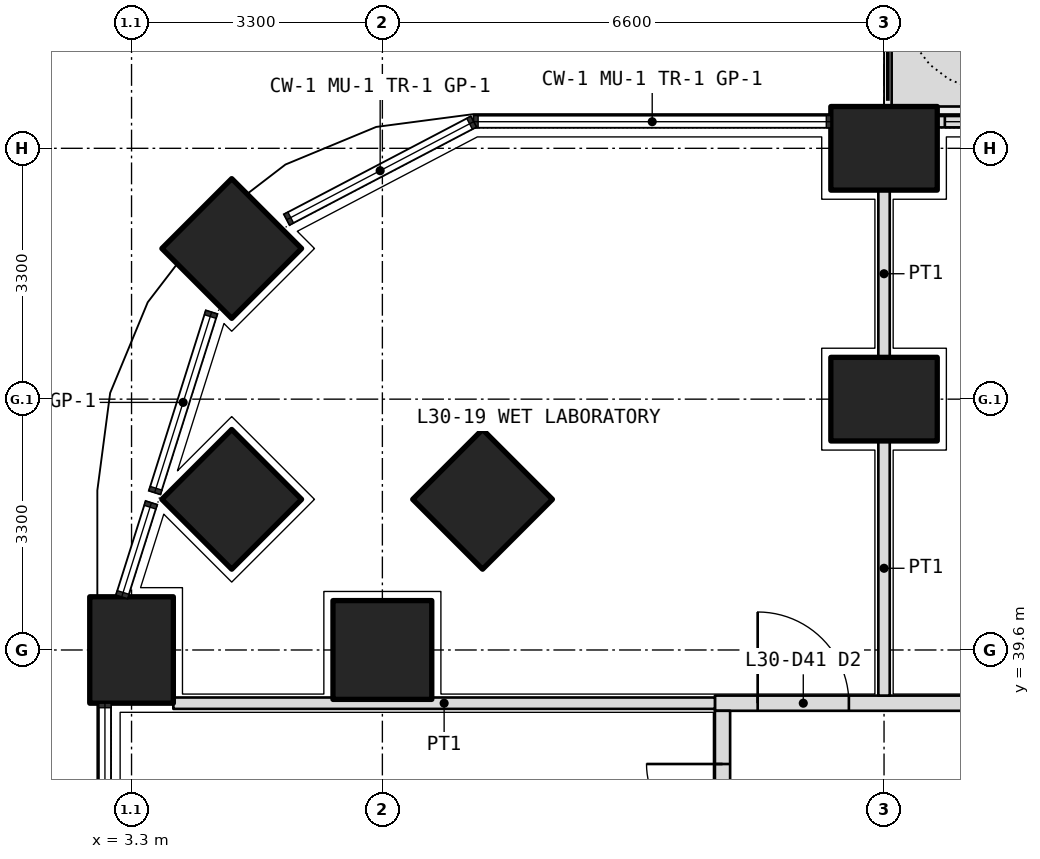
"""IFC4 building model, lengths in metres.
Left out: names, types, materials, properties, quantities, classifications, styles, units other than length and angle.
Written with IfcOpenShell. Run it as: python <this file> out.ifc"""

import sys

from ifc_helpers import new_model, si_unit, direction, frame, frame_2d, origin, origin_2d, place, context, subcontext, project, spatial, polyline, rectangle, outline, extrude, element, fill, save


model = new_model("IFC4")
c1 = context("Model", 3, precision=1e-05, world=origin(), true_north=direction((0.0, 1.0)))
c2 = subcontext(c1, "Body", "Model", "MODEL_VIEW")
j1 = project(units=[si_unit("LENGTHUNIT", "METRE"), si_unit("PLANEANGLEUNIT", "RADIAN")], contexts=[c1])
p1 = place(None, origin())
s1 = spatial("IfcSite", under=j1, at=p1, CompositionType="ELEMENT")
p2 = place(p1, origin())
s2 = spatial("IfcBuilding", under=s1, at=p2, CompositionType="ELEMENT")
p3 = place(p2, frame((0.0, 0.0, 132.6)))
s3 = spatial("IfcBuildingStorey", under=s2, at=p3, CompositionType="ELEMENT", Elevation=132.6)
p4 = place(p3, frame((4.618, 44.882, 0.0), z_axis=(0.0, 0.0, 1.0), x_axis=(0.707106781187, 0.707106781187, 0.0)))
e1 = element("IfcColumn", 1, at=p4, inside=s3, PredefinedType="COLUMN", context=c2, shape_type="SweptSolid", body=[
    extrude(rectangle(XDim=1.3, YDim=1.3, at=origin_2d()), origin(), (0.0, 0.0, 1.0), 4.2),
])
for number, where, z_axis, x_axis in (
    (2, (3.3, 39.6, 0.0), (0.0, 0.0, 1.0), (0.0, 1.0, 0.0)),
    (3, (13.2, 46.2, 0.0), (0.0, 0.0, 1.0), (1.0, 0.0, 0.0)),
):
    element("IfcColumn", number, at=place(p3, frame(where, z_axis=z_axis, x_axis=x_axis)), inside=s3, PredefinedType="COLUMN", context=c2, shape_type="SweptSolid", body=[
        extrude(rectangle(XDim=1.4, YDim=1.1, at=origin_2d()), origin(), (0.0, 0.0, 1.0), 4.2),
    ])
for number, where, z_axis, x_axis in (
    (4, (6.6, 39.6, 0.0), (0.0, 0.0, 1.0), (1.0, 0.0, 0.0)),
    (5, (4.618, 41.582, 0.0), (0.0, 0.0, 1.0), (0.707, 0.707, 0.0)),
):
    element("IfcColumn", number, at=place(p3, frame(where, z_axis=z_axis, x_axis=x_axis)), inside=s3, PredefinedType="COLUMN", context=c2, shape_type="SweptSolid", body=[
        extrude(rectangle(XDim=1.3, YDim=1.3, at=origin_2d()), origin(), (0.0, 0.0, 1.0), 4.2),
    ])
p5 = place(p3, frame((13.2, 42.9, 0.0), z_axis=(0.0, 0.0, 1.0), x_axis=(1.0, 0.0, 0.0)))
e6 = element("IfcColumn", 6, at=p5, inside=s3, PredefinedType="COLUMN", context=c2, shape_type="SweptSolid", body=[
    extrude(rectangle(XDim=1.4, YDim=1.1, at=origin_2d()), origin(), (0.0, 0.0, 1.0), 4.2),
])
p6 = place(p3, frame((7.918, 41.582, 0.0), z_axis=(0.0, 0.0, 1.0), x_axis=(0.707106781187, 0.707106781187, 0.0)))
e7 = element("IfcColumn", 7, at=p6, inside=s3, PredefinedType="COLUMN", context=c2, shape_type="SweptSolid", body=[
    extrude(rectangle(XDim=1.3, YDim=1.3, at=origin_2d()), origin(), (0.0, 0.0, 1.0), 4.2),
])
p7 = place(p3, origin())
e8 = element("IfcWall", 8, at=p7, inside=s3, PredefinedType="USERDEFINED", context=c2, shape_type="SweptSolid", body=[
    extrude(outline(polyline([(13.3, 46.75), (15.75, 46.75), (15.75, 47.75), (13.3, 47.75), (13.3, 46.75)]), holes=[polyline([(13.45, 46.9), (15.6, 46.9), (15.6, 47.6), (13.45, 47.6), (13.45, 46.9)])]), origin(), (0.0, 0.0, 1.0), 1.05),
])
p8 = place(p3, frame((19.1, 46.55, 0.0), z_axis=(0.0, 0.0, 1.0), x_axis=(-1.0, 0.0, 0.0)))
e9 = element("IfcWall", 9, at=p8, inside=s3, PredefinedType="SOLIDWALL", context=c2, shape_type="SweptSolid", body=[
    extrude(rectangle(XDim=5.2, YDim=0.15, at=frame_2d((2.6, 0.0))), origin(), (0.0, 0.0, 1.0), 2.7),
])
p9 = place(p8, frame((1.35, 0.0, 0.0)))
e10 = element("IfcOpeningElement", 10, at=p9, cuts=e9, PredefinedType="OPENING", context=c2, shape_type="SweptSolid", body=[
    extrude(rectangle(XDim=1.0, YDim=2.4, at=frame_2d((0.5, 1.2))), frame((0.0, 0.085, 0.0), z_axis=(0.0, -1.0, 0.0), x_axis=(1.0, 0.0, 0.0)), (0.0, 0.0, 1.0), 0.17),
])
p10 = place(p8, frame((0.1, 0.0, 0.1)))
e11 = element("IfcOpeningElement", 11, at=p10, cuts=e9, PredefinedType="OPENING", context=c2, shape_type="SweptSolid", body=[
    extrude(rectangle(XDim=1.15, YDim=2.3, at=frame_2d((0.575, 1.15))), frame((0.0, 0.085, 0.0), z_axis=(0.0, -1.0, 0.0), x_axis=(1.0, 0.0, 0.0)), (0.0, 0.0, 1.0), 0.17),
])
p11 = place(p8, frame((2.85, 0.0, 0.1)))
e12 = element("IfcOpeningElement", 12, at=p11, cuts=e9, PredefinedType="OPENING", context=c2, shape_type="SweptSolid", body=[
    extrude(rectangle(XDim=2.25, YDim=2.3, at=frame_2d((1.125, 1.15))), frame((0.0, 0.085, 0.0), z_axis=(0.0, -1.0, 0.0), x_axis=(1.0, 0.0, 0.0)), (0.0, 0.0, 1.0), 0.17),
])
p12 = place(p3, frame((10.975, 38.9, 0.0), z_axis=(0.0, 0.0, 1.0), x_axis=(1.0, 0.0, 0.0)))
e13 = element("IfcWall", 13, at=p12, inside=s3, PredefinedType="PARTITIONING", context=c2, shape_type="SweptSolid", body=[
    extrude(rectangle(XDim=30.85, YDim=0.2, at=frame_2d((15.425, 0.0))), origin(), (0.0, 0.0, 1.0), 2.85),
])
p13 = place(p12, frame((0.562, 0.0, 0.0)))
e14 = element("IfcOpeningElement", 14, at=p13, cuts=e13, PredefinedType="OPENING", context=c2, shape_type="SweptSolid", body=[
    extrude(rectangle(XDim=1.2, YDim=2.1, at=frame_2d((0.6, 1.05))), frame((0.0, 0.11, 0.0), z_axis=(0.0, -1.0, 0.0), x_axis=(1.0, 0.0, 0.0)), (0.0, 0.0, 1.0), 0.22),
])
p14 = place(p12, frame((6.675, 0.0, 0.0)))
e15 = element("IfcOpeningElement", 15, at=p14, cuts=e13, PredefinedType="OPENING", context=c2, shape_type="SweptSolid", body=[
    extrude(rectangle(XDim=1.0, YDim=2.1, at=frame_2d((0.5, 1.05))), frame((0.0, 0.11, 0.0), z_axis=(0.0, -1.0, 0.0), x_axis=(1.0, 0.0, 0.0)), (0.0, 0.0, 1.0), 0.22),
])
p15 = place(p12, frame((16.575, 0.0, 0.0)))
e16 = element("IfcOpeningElement", 16, at=p15, cuts=e13, PredefinedType="OPENING", context=c2, shape_type="SweptSolid", body=[
    extrude(rectangle(XDim=1.0, YDim=2.1, at=frame_2d((0.5, 1.05))), frame((0.0, 0.11, 0.0), z_axis=(0.0, -1.0, 0.0), x_axis=(1.0, 0.0, 0.0)), (0.0, 0.0, 1.0), 0.22),
])
p16 = place(p12, frame((25.887, 0.0, 0.0)))
e17 = element("IfcOpeningElement", 17, at=p16, cuts=e13, PredefinedType="OPENING", context=c2, shape_type="SweptSolid", body=[
    extrude(rectangle(XDim=1.0, YDim=2.1, at=frame_2d((0.5, 1.05))), frame((0.0, 0.11, 0.0), z_axis=(0.0, -1.0, 0.0), x_axis=(1.0, 0.0, 0.0)), (0.0, 0.0, 1.0), 0.22),
])
p17 = place(p3, frame((11.075, 11.175, 0.0), z_axis=(0.0, 0.0, 1.0), x_axis=(0.0, 1.0, 0.0)))
e18 = element("IfcWall", 18, at=p17, inside=s3, PredefinedType="PARTITIONING", context=c2, shape_type="SweptSolid", body=[
    extrude(rectangle(XDim=27.625, YDim=0.2, at=frame_2d((13.812, 0.0))), origin(), (0.0, 0.0, 1.0), 2.85),
])
p18 = place(p17, frame((0.462, 0.0, 0.0)))
e19 = element("IfcOpeningElement", 19, at=p18, cuts=e18, PredefinedType="OPENING", context=c2, shape_type="SweptSolid", body=[
    extrude(rectangle(XDim=1.0, YDim=2.1, at=frame_2d((0.5, 1.05))), frame((0.0, 0.11, 0.0), z_axis=(0.0, -1.0, 0.0), x_axis=(1.0, 0.0, 0.0)), (0.0, 0.0, 1.0), 0.22),
])
p19 = place(p17, frame((2.575, 0.0, 0.0)))
e20 = element("IfcOpeningElement", 20, at=p19, cuts=e18, PredefinedType="OPENING", context=c2, shape_type="SweptSolid", body=[
    extrude(rectangle(XDim=1.0, YDim=2.1, at=frame_2d((0.5, 1.05))), frame((0.0, 0.11, 0.0), z_axis=(0.0, -1.0, 0.0), x_axis=(1.0, 0.0, 0.0)), (0.0, 0.0, 1.0), 0.22),
])
p20 = place(p17, frame((5.625, 0.0, 0.0)))
e21 = element("IfcOpeningElement", 21, at=p20, cuts=e18, PredefinedType="OPENING", context=c2, shape_type="SweptSolid", body=[
    extrude(rectangle(XDim=0.9, YDim=2.1, at=frame_2d((0.45, 1.05))), frame((0.0, 0.11, 0.0), z_axis=(0.0, -1.0, 0.0), x_axis=(1.0, 0.0, 0.0)), (0.0, 0.0, 1.0), 0.22),
])
p21 = place(p17, frame((9.425, 0.0, 0.0)))
e22 = element("IfcOpeningElement", 22, at=p21, cuts=e18, PredefinedType="OPENING", context=c2, shape_type="SweptSolid", body=[
    extrude(rectangle(XDim=0.9, YDim=2.1, at=frame_2d((0.45, 1.05))), frame((0.0, 0.11, 0.0), z_axis=(0.0, -1.0, 0.0), x_axis=(1.0, 0.0, 0.0)), (0.0, 0.0, 1.0), 0.22),
])
p22 = place(p17, frame((12.975, 0.0, 0.0)))
e23 = element("IfcOpeningElement", 23, at=p22, cuts=e18, PredefinedType="OPENING", context=c2, shape_type="SweptSolid", body=[
    extrude(rectangle(XDim=1.0, YDim=2.1, at=frame_2d((0.5, 1.05))), frame((0.0, 0.11, 0.0), z_axis=(0.0, -1.0, 0.0), x_axis=(1.0, 0.0, 0.0)), (0.0, 0.0, 1.0), 0.22),
])
p23 = place(p17, frame((19.675, 0.0, 0.0)))
e24 = element("IfcOpeningElement", 24, at=p23, cuts=e18, PredefinedType="OPENING", context=c2, shape_type="SweptSolid", body=[
    extrude(rectangle(XDim=1.0, YDim=2.1, at=frame_2d((0.5, 1.05))), frame((0.0, 0.11, 0.0), z_axis=(0.0, -1.0, 0.0), x_axis=(1.0, 0.0, 0.0)), (0.0, 0.0, 1.0), 0.22),
])
p24 = place(p17, frame((25.925, 0.0, 0.0)))
e25 = element("IfcOpeningElement", 25, at=p24, cuts=e18, PredefinedType="OPENING", context=c2, shape_type="SweptSolid", body=[
    extrude(rectangle(XDim=1.0, YDim=2.1, at=frame_2d((0.5, 1.05))), frame((0.0, 0.11, 0.0), z_axis=(0.0, -1.0, 0.0), x_axis=(1.0, 0.0, 0.0)), (0.0, 0.0, 1.0), 0.22),
])
p25 = place(p3, frame((3.85, 38.9, 0.0), z_axis=(0.0, 0.0, 1.0), x_axis=(1.0, 0.0, 0.0)))
e26 = element("IfcWall", 26, at=p25, inside=s3, PredefinedType="PARTITIONING", context=c2, shape_type="SweptSolid", body=[
    extrude(rectangle(XDim=7.125, YDim=0.15, at=frame_2d((3.562, 0.0))), origin(), (0.0, 0.0, 1.0), 2.85),
])
p26 = place(p3, frame((13.2, 45.65, 0.0), z_axis=(0.0, 0.0, 1.0), x_axis=(0.0, -1.0, 0.0)))
e27 = element("IfcWall", 27, at=p26, inside=s3, PredefinedType="PARTITIONING", context=c2, shape_type="SweptSolid", body=[
    extrude(rectangle(XDim=2.2, YDim=0.15, at=frame_2d((1.1, 0.0))), origin(), (0.0, 0.0, 1.0), 2.85),
])
p27 = place(p3, frame((13.2, 42.35, 0.0), z_axis=(0.0, 0.0, 1.0), x_axis=(0.0, -1.0, 0.0)))
e28 = element("IfcWall", 28, at=p27, inside=s3, PredefinedType="PARTITIONING", context=c2, shape_type="SweptSolid", body=[
    extrude(rectangle(XDim=3.35, YDim=0.15, at=frame_2d((1.675, 0.0))), origin(), (0.0, 0.0, 1.0), 2.85),
])
p28 = place(p11, origin())
e29 = element("IfcWindow", 29, at=p28, inside=s3, PartitioningType="SINGLE_PANEL", PredefinedType="WINDOW", context=c2, shape_type="SweptSolid", body=[
    extrude(rectangle(XDim=2.25, YDim=2.3, at=frame_2d((1.125, 1.15))), frame((0.0, 0.03, 0.0), z_axis=(0.0, -1.0, 0.0), x_axis=(1.0, 0.0, 0.0)), (0.0, 0.0, 1.0), 0.06),
])
fill(e12, e29)
p29 = place(p13, origin())
e30 = element("IfcDoor", 30, at=p29, inside=s3, OperationType="DOUBLE_DOOR_SINGLE_SWING", PredefinedType="DOOR", context=c2, shape_type="SweptSolid", body=[
    extrude(rectangle(XDim=1.2, YDim=2.1, at=frame_2d((0.6, 1.05))), frame((0.0, 0.025, 0.0), z_axis=(0.0, -1.0, 0.0), x_axis=(1.0, 0.0, 0.0)), (0.0, 0.0, 1.0), 0.05),
])
fill(e14, e30)
p30 = place(p24, origin())
e31 = element("IfcDoor", 31, at=p30, inside=s3, OperationType="SINGLE_SWING_RIGHT", PredefinedType="DOOR", context=c2, shape_type="SweptSolid", body=[
    extrude(rectangle(XDim=1.0, YDim=2.1, at=frame_2d((0.5, 1.05))), frame((0.0, 0.025, 0.0), z_axis=(0.0, -1.0, 0.0), x_axis=(1.0, 0.0, 0.0)), (0.0, 0.0, 1.0), 0.05),
])
fill(e25, e31)
save(model, sys.argv[1])
